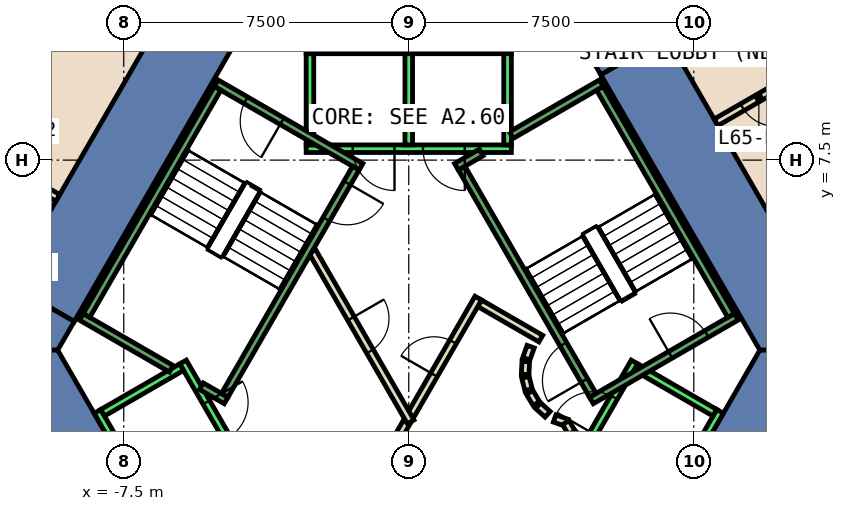
"""IFC4 building model, lengths in metres.
Left out: names, types, materials, properties, quantities, classifications, styles, units other than length and angle.
Written with IfcOpenShell. Run it as: python <this file> out.ifc"""

import sys

from ifc_helpers import new_model, si_unit, direction, frame, frame_2d, origin, place, context, subcontext, project, spatial, polyline, rectangle, outline, extrude, element, fill, save


model = new_model("IFC4")
c1 = context("Model", 3, precision=1e-05, world=origin(), true_north=direction((0.0, 1.0)))
c2 = subcontext(c1, "Body", "Model", "MODEL_VIEW")
j1 = project(units=[si_unit("LENGTHUNIT", "METRE"), si_unit("PLANEANGLEUNIT", "RADIAN")], contexts=[c1])
p1 = place(None, origin())
s1 = spatial("IfcSite", under=j1, at=p1, CompositionType="ELEMENT")
p2 = place(p1, origin())
s2 = spatial("IfcBuilding", under=s1, at=p2, CompositionType="ELEMENT")
p3 = place(p2, frame((0.0, 0.0, 281.0)))
s3 = spatial("IfcBuildingStorey", under=s2, at=p3, CompositionType="ELEMENT", Elevation=281.0)
p4 = place(p3, frame((0.0, 0.0, -0.6)))
e1 = element("IfcWall", 1, at=p4, inside=s3, PredefinedType="SHEAR", context=c2, shape_type="SweptSolid", body=[
    extrude(outline(polyline([(6.786, 10.747), (5.054, 9.747), (9.238, 2.5), (11.547, 2.5), (6.786, 10.747)])), origin(), (0.0, 0.0, 1.0), 5.4),
])
p5 = place(p3, frame((0.0, 0.0, 3.6)))
e2 = element("IfcWall", 2, at=p5, inside=s3, PredefinedType="SHEAR", context=c2, shape_type="SweptSolid", body=[
    extrude(outline(polyline([(5.889, 12.301), (5.544, 12.102), (4.619, 10.5), (5.054, 9.747), (6.786, 10.747), (5.889, 12.301)])), origin(), (0.0, 0.0, 1.0), 1.2),
])
p6 = place(p3, frame((0.0, 0.0, -0.6)))
e3 = element("IfcWall", 3, at=p6, inside=s3, PredefinedType="SHEAR", context=c2, shape_type="SweptSolid", body=[
    extrude(outline(polyline([(-10.535, 4.253), (-8.803, 3.253), (-4.619, 10.5), (-5.774, 12.5), (-10.535, 4.253)])), origin(), (0.0, 0.0, 1.0), 5.4),
])
p7 = place(p3, frame((0.0, 0.0, 3.6)))
e4 = element("IfcWall", 4, at=p7, inside=s3, PredefinedType="SHEAR", context=c2, shape_type="SweptSolid", body=[
    extrude(outline(polyline([(-11.432, 2.699), (-11.088, 2.5), (-9.238, 2.5), (-8.803, 3.253), (-10.535, 4.253), (-11.432, 2.699)])), origin(), (0.0, 0.0, 1.0), 1.2),
])
p8 = place(p3, frame((0.0, 0.0, -0.6)))
e5 = element("IfcWall", 5, at=p8, inside=s3, PredefinedType="SHEAR", context=c2, shape_type="SweptSolid", body=[
    extrude(outline(polyline([(-11.547, 2.5), (-5.774, -7.5), (-4.619, -5.5), (-9.238, 2.5), (-11.547, 2.5)])), origin(), (0.0, 0.0, 1.0), 5.4),
])
p9 = place(p3, frame((0.0, 0.0, -0.6)))
e6 = element("IfcWall", 6, at=p9, inside=s3, PredefinedType="SHEAR", context=c2, shape_type="SweptSolid", body=[
    extrude(outline(polyline([(5.774, -7.5), (11.547, 2.5), (9.238, 2.5), (4.619, -5.5), (5.774, -7.5)])), origin(), (0.0, 0.0, 1.0), 5.4),
])
p10 = place(p3, frame((-0.982, -1.0, 0.0), z_axis=(0.0, 0.0, 1.0), x_axis=(0.50024047865, 0.865886518847, 0.0)))
e7 = element("IfcWall", 7, at=p10, inside=s3, PredefinedType="PARTITIONING", context=c2, shape_type="SweptSolid", body=[
    extrude(rectangle(XDim=1.863, YDim=0.2, at=frame_2d((0.931, 0.0))), origin(), (0.0, 0.0, 1.0), 4.8),
])
p11 = place(p3, frame((1.866, 3.732, 0.0), z_axis=(0.0, 0.0, 1.0), x_axis=(0.866043361281, -0.499968895414, 0.0)))
e8 = element("IfcWall", 8, at=p11, inside=s3, PredefinedType="PARTITIONING", context=c2, shape_type="SweptSolid", body=[
    extrude(rectangle(XDim=1.858, YDim=0.2, at=frame_2d((0.929, 0.0))), origin(), (0.0, 0.0, 1.0), 4.8),
])
p12 = place(p3, frame((3.208, 2.592, 0.0), z_axis=(0.0, 0.0, 1.0), x_axis=(-0.337388820924, -0.941365382578, 0.0)))
e9 = element("IfcWall", 9, at=p12, inside=s3, PredefinedType="PARTITIONING", context=c2, shape_type="SweptSolid", body=[
    extrude(rectangle(XDim=0.338, YDim=0.2, at=frame_2d((0.169, 0.0))), origin(), (0.0, 0.0, 1.0), 4.8),
])
p13 = place(p3, frame((3.079, 2.199, 0.0), z_axis=(0.0, 0.0, 1.0), x_axis=(-0.047771483479, -0.998858290933, 0.0)))
e10 = element("IfcWall", 10, at=p13, inside=s3, PredefinedType="PARTITIONING", context=c2, shape_type="SweptSolid", body=[
    extrude(rectangle(XDim=0.337, YDim=0.2, at=frame_2d((0.169, 0.0))), origin(), (0.0, 0.0, 1.0), 4.8),
])
p14 = place(p3, frame((3.07, 1.786, 0.0), z_axis=(0.0, 0.0, 1.0), x_axis=(0.242705583207, -0.970099994784, 0.0)))
e11 = element("IfcWall", 11, at=p14, inside=s3, PredefinedType="PARTITIONING", context=c2, shape_type="SweptSolid", body=[
    extrude(rectangle(XDim=0.338, YDim=0.2, at=frame_2d((0.169, 0.0))), origin(), (0.0, 0.0, 1.0), 4.8),
])
for number, where, z_axis, x_axis in (
    (12, (3.182, 1.388, 0.0), (0.0, 0.0, 1.0), (0.512, -0.859, 0.0)),
    (13, (3.404, 1.039, 0.0), (0.0, 0.0, 1.0), (0.74, -0.672, 0.0)),
):
    element("IfcWall", number, at=place(p3, frame(where, z_axis=z_axis, x_axis=x_axis)), inside=s3, PredefinedType="PARTITIONING", context=c2, shape_type="SweptSolid", body=[
        extrude(rectangle(XDim=0.338, YDim=0.2, at=frame_2d((0.169, 0.0))), origin(), (0.0, 0.0, 1.0), 4.8),
    ])
p15 = place(p3, frame((3.838, 0.702, 0.0), z_axis=(0.0, 0.0, 1.0), x_axis=(0.941035081519, -0.338308993895, 0.0)))
e14 = element("IfcWall", 14, at=p15, inside=s3, PredefinedType="PARTITIONING", context=c2, shape_type="SweptSolid", body=[
    extrude(rectangle(XDim=0.337, YDim=0.2, at=frame_2d((0.168, 0.0))), origin(), (0.0, 0.0, 1.0), 4.8),
])
p16 = place(p3, frame((4.132, 0.593, 0.0), z_axis=(0.0, 0.0, 1.0), x_axis=(0.513561617048, -0.858052717201, 0.0)))
e15 = element("IfcWall", 15, at=p16, inside=s3, PredefinedType="PARTITIONING", context=c2, shape_type="SweptSolid", body=[
    extrude(rectangle(XDim=0.308, YDim=0.2, at=frame_2d((0.154, 0.0))), origin(), (0.0, 0.0, 1.0), 4.8),
])
p17 = place(p3, frame((4.301, 0.315, 0.0), z_axis=(0.0, 0.0, 1.0), x_axis=(0.741798017506, -0.670623367639, 0.0)))
e16 = element("IfcWall", 16, at=p17, inside=s3, PredefinedType="PARTITIONING", context=c2, shape_type="SweptSolid", body=[
    extrude(rectangle(XDim=0.309, YDim=0.2, at=frame_2d((0.154, 0.0))), origin(), (0.0, 0.0, 1.0), 4.8),
])
p18 = place(p3, frame((0.05, 0.787, 0.0), z_axis=(0.0, 0.0, 1.0), x_axis=(0.499954076797, 0.866051915934, 0.0)))
e17 = element("IfcWall", 17, at=p18, inside=s3, PredefinedType="PARTITIONING", context=c2, shape_type="SweptSolid", body=[
    extrude(rectangle(XDim=3.558, YDim=0.2, at=frame_2d((1.779, 0.0))), origin(), (0.0, 0.0, 1.0), 4.8),
])
p19 = place(p18, frame((1.229, 0.0, 0.0)))
e18 = element("IfcOpeningElement", 18, at=p19, cuts=e17, PredefinedType="OPENING", context=c2, shape_type="SweptSolid", body=[
    extrude(rectangle(XDim=1.0, YDim=2.1, at=frame_2d((0.5, 1.05))), frame((0.0, 0.11, 0.0), z_axis=(0.0, -1.0, 0.0), x_axis=(1.0, 0.0, 0.0)), (0.0, 0.0, 1.0), 0.22),
])
p20 = place(p3, frame((-2.54, 5.1, 0.0), z_axis=(0.0, 0.0, 1.0), x_axis=(0.499925051871, -0.866068670783, 0.0)))
e19 = element("IfcWall", 19, at=p20, inside=s3, PredefinedType="PARTITIONING", context=c2, shape_type="SweptSolid", body=[
    extrude(rectangle(XDim=5.181, YDim=0.2, at=frame_2d((2.59, 0.0))), origin(), (0.0, 0.0, 1.0), 4.8),
])
p21 = place(p20, frame((2.04, 0.0, 0.0)))
e20 = element("IfcOpeningElement", 20, at=p21, cuts=e19, PredefinedType="OPENING", context=c2, shape_type="SweptSolid", body=[
    extrude(rectangle(XDim=1.0, YDim=2.1, at=frame_2d((0.5, 1.05))), frame((0.0, 0.11, 0.0), z_axis=(0.0, -1.0, 0.0), x_axis=(1.0, 0.0, 0.0)), (0.0, 0.0, 1.0), 0.22),
])
p22 = place(p3, frame((10.165, 9.693, 0.0), z_axis=(0.0, 0.0, 1.0), x_axis=(-0.865955154139, -0.50012165622, 0.0)))
e21 = element("IfcWall", 21, at=p22, inside=s3, PredefinedType="PARTITIONING", context=c2, shape_type="SweptSolid", body=[
    extrude(rectangle(XDim=2.4, YDim=0.2, at=frame_2d((1.2, 0.0))), origin(), (0.0, 0.0, 1.0), 2.4),
])
p23 = place(p22, frame((0.6, 0.0, 0.0)))
e22 = element("IfcOpeningElement", 22, at=p23, cuts=e21, PredefinedType="OPENING", context=c2, shape_type="SweptSolid", body=[
    extrude(rectangle(XDim=1.0, YDim=2.1, at=frame_2d((0.5, 1.05))), frame((0.0, 0.11, 0.0), z_axis=(0.0, -1.0, 0.0), x_axis=(1.0, 0.0, 0.0)), (0.0, 0.0, 1.0), 0.22),
])
p24 = place(p3, frame((-11.312, 7.707, 0.0), z_axis=(0.0, 0.0, 1.0), x_axis=(0.865999212041, -0.500045362686, 0.0)))
e23 = element("IfcWall", 23, at=p24, inside=s3, PredefinedType="PARTITIONING", context=c2, shape_type="SweptSolid", body=[
    extrude(rectangle(XDim=2.4, YDim=0.2, at=frame_2d((1.2, 0.0))), origin(), (0.0, 0.0, 1.0), 4.8),
])
p25 = place(p24, frame((0.6, 0.0, 0.0)))
e24 = element("IfcOpeningElement", 24, at=p25, cuts=e23, PredefinedType="OPENING", context=c2, shape_type="SweptSolid", body=[
    extrude(rectangle(XDim=1.0, YDim=2.1, at=frame_2d((0.5, 1.05))), frame((0.0, 0.11, 0.0), z_axis=(0.0, -1.0, 0.0), x_axis=(1.0, 0.0, 0.0)), (0.0, 0.0, 1.0), 0.22),
])
p26 = place(p3, frame((2.7, 7.8, 0.0), z_axis=(0.0, 0.0, 1.0), x_axis=(-1.0, 0.0, 0.0)))
e25 = element("IfcWall", 25, at=p26, inside=s3, PredefinedType="STANDARD", context=c2, shape_type="SweptSolid", body=[
    extrude(rectangle(XDim=5.4, YDim=0.2, at=frame_2d((2.7, 0.0))), origin(), (0.0, 0.0, 1.0), 4.8),
])
p27 = place(p26, frame((1.225, 0.0, 0.0)))
e26 = element("IfcOpeningElement", 26, at=p27, cuts=e25, PredefinedType="OPENING", context=c2, shape_type="SweptSolid", body=[
    extrude(rectangle(XDim=1.1, YDim=2.1, at=frame_2d((0.55, 1.05))), frame((0.0, 0.11, 0.0), z_axis=(0.0, -1.0, 0.0), x_axis=(1.0, 0.0, 0.0)), (0.0, 0.0, 1.0), 0.22),
])
p28 = place(p26, frame((3.075, 0.0, 0.0)))
e27 = element("IfcOpeningElement", 27, at=p28, cuts=e25, PredefinedType="OPENING", context=c2, shape_type="SweptSolid", body=[
    extrude(rectangle(XDim=1.1, YDim=2.1, at=frame_2d((0.55, 1.05))), frame((0.0, 0.11, 0.0), z_axis=(0.0, -1.0, 0.0), x_axis=(1.0, 0.0, 0.0)), (0.0, 0.0, 1.0), 0.22),
])
p29 = place(p3, frame((2.7, 10.4, 0.0), z_axis=(0.0, 0.0, 1.0), x_axis=(-1.0, 0.0, 0.0)))
e28 = element("IfcWall", 28, at=p29, inside=s3, PredefinedType="STANDARD", context=c2, shape_type="SweptSolid", body=[
    extrude(rectangle(XDim=5.4, YDim=0.2, at=frame_2d((2.7, 0.0))), origin(), (0.0, 0.0, 1.0), 4.8),
])
for number, where, z_axis, x_axis in (
    (29, (2.6, 7.9, 0.0), (0.0, 0.0, 1.0), (0.0, 1.0, 0.0)),
    (30, (0.0, 7.9, 0.0), (0.0, 0.0, 1.0), (0.0, 1.0, 0.0)),
    (31, (-2.6, 7.9, 0.0), (0.0, 0.0, 1.0), (0.0, 1.0, 0.0)),
):
    element("IfcWall", number, at=place(p3, frame(where, z_axis=z_axis, x_axis=x_axis)), inside=s3, PredefinedType="STANDARD", context=c2, shape_type="SweptSolid", body=[
        extrude(rectangle(XDim=2.4, YDim=0.2, at=frame_2d((1.2, 0.0))), origin(), (0.0, 0.0, 1.0), 4.8),
    ])
p30 = place(p3, frame((-5.94, 2.188, 0.0), z_axis=(0.0, 0.0, 1.0), x_axis=(0.500034260056, -0.866005622828, 0.0)))
e32 = element("IfcWall", 32, at=p30, inside=s3, PredefinedType="STANDARD", context=c2, shape_type="SweptSolid", body=[
    extrude(rectangle(XDim=5.399, YDim=0.2, at=frame_2d((2.7, 0.0))), origin(), (0.0, 0.0, 1.0), 4.8),
])
p31 = place(p30, frame((3.075, 0.0, 0.0)))
e33 = element("IfcOpeningElement", 33, at=p31, cuts=e32, PredefinedType="OPENING", context=c2, shape_type="SweptSolid", body=[
    extrude(rectangle(XDim=1.1, YDim=2.1, at=frame_2d((0.55, 1.05))), frame((0.0, 0.11, 0.0), z_axis=(0.0, -1.0, 0.0), x_axis=(1.0, 0.0, 0.0)), (0.0, 0.0, 1.0), 0.22),
])
p32 = place(p30, frame((1.225, 0.0, 0.0)))
e34 = element("IfcOpeningElement", 34, at=p32, cuts=e32, PredefinedType="OPENING", context=c2, shape_type="SweptSolid", body=[
    extrude(rectangle(XDim=1.1, YDim=2.1, at=frame_2d((0.55, 1.05))), frame((0.0, 0.11, 0.0), z_axis=(0.0, -1.0, 0.0), x_axis=(1.0, 0.0, 0.0)), (0.0, 0.0, 1.0), 0.22),
])
p33 = place(p3, frame((-8.192, 0.888, 0.0), z_axis=(0.0, 0.0, 1.0), x_axis=(0.500034260056, -0.866005622828, 0.0)))
e35 = element("IfcWall", 35, at=p33, inside=s3, PredefinedType="STANDARD", context=c2, shape_type="SweptSolid", body=[
    extrude(rectangle(XDim=5.399, YDim=0.2, at=frame_2d((2.7, 0.0))), origin(), (0.0, 0.0, 1.0), 4.8),
])
p34 = place(p3, frame((-5.977, 2.052, 0.0), z_axis=(0.0, 0.0, 1.0), x_axis=(-0.865973769406, -0.500089422704, 0.0)))
e36 = element("IfcWall", 36, at=p34, inside=s3, PredefinedType="STANDARD", context=c2, shape_type="SweptSolid", body=[
    extrude(rectangle(XDim=2.399, YDim=0.2, at=frame_2d((1.2, 0.0))), origin(), (0.0, 0.0, 1.0), 4.8),
])
p35 = place(p3, frame((3.24, -2.488, 0.0), z_axis=(0.0, 0.0, 1.0), x_axis=(0.500034260056, 0.866005622828, 0.0)))
e37 = element("IfcWall", 37, at=p35, inside=s3, PredefinedType="STANDARD", context=c2, shape_type="SweptSolid", body=[
    extrude(rectangle(XDim=5.399, YDim=0.2, at=frame_2d((2.7, 0.0))), origin(), (0.0, 0.0, 1.0), 4.8),
])
p36 = place(p35, frame((3.225, 0.0, 0.0)))
e38 = element("IfcOpeningElement", 38, at=p36, cuts=e37, PredefinedType="OPENING", context=c2, shape_type="SweptSolid", body=[
    extrude(rectangle(XDim=1.1, YDim=2.1, at=frame_2d((0.55, 1.05))), frame((0.0, 0.11, 0.0), z_axis=(0.0, -1.0, 0.0), x_axis=(1.0, 0.0, 0.0)), (0.0, 0.0, 1.0), 0.22),
])
p37 = place(p35, frame((1.225, 0.0, 0.0)))
e39 = element("IfcOpeningElement", 39, at=p37, cuts=e37, PredefinedType="OPENING", context=c2, shape_type="SweptSolid", body=[
    extrude(rectangle(XDim=1.1, YDim=2.1, at=frame_2d((0.55, 1.05))), frame((0.0, 0.11, 0.0), z_axis=(0.0, -1.0, 0.0), x_axis=(1.0, 0.0, 0.0)), (0.0, 0.0, 1.0), 0.22),
])
p38 = place(p3, frame((5.492, -3.788, 0.0), z_axis=(0.0, 0.0, 1.0), x_axis=(0.500034260056, 0.866005622828, 0.0)))
e40 = element("IfcWall", 40, at=p38, inside=s3, PredefinedType="STANDARD", context=c2, shape_type="SweptSolid", body=[
    extrude(rectangle(XDim=5.399, YDim=0.2, at=frame_2d((2.7, 0.0))), origin(), (0.0, 0.0, 1.0), 4.8),
])
p39 = place(p3, frame((5.977, 2.052, 0.0), z_axis=(0.0, 0.0, 1.0), x_axis=(0.865973769406, -0.500089422704, 0.0)))
e41 = element("IfcWall", 41, at=p39, inside=s3, PredefinedType="STANDARD", context=c2, shape_type="SweptSolid", body=[
    extrude(rectangle(XDim=2.399, YDim=0.2, at=frame_2d((1.2, 0.0))), origin(), (0.0, 0.0, 1.0), 4.8),
])
p40 = place(p3, frame((4.806, 1.176, 0.0), z_axis=(0.0, 0.0, 1.0), x_axis=(0.866059941101, 0.499940174841, 0.0)))
e42 = element("IfcWall", 42, at=p40, inside=s3, PredefinedType="STANDARD", context=c2, shape_type="SweptSolid", body=[
    extrude(rectangle(XDim=4.4, YDim=0.2, at=frame_2d((2.2, 0.0))), origin(), (0.0, 0.0, 1.0), 4.8),
])
p41 = place(p40, frame((2.4, 0.0, 0.0)))
e43 = element("IfcOpeningElement", 43, at=p41, cuts=e42, PredefinedType="OPENING", context=c2, shape_type="SweptSolid", body=[
    extrude(rectangle(XDim=1.1, YDim=2.2, at=frame_2d((0.55, 1.1))), frame((0.0, 0.11, 0.0), z_axis=(0.0, -1.0, 0.0), x_axis=(1.0, 0.0, 0.0)), (0.0, 0.0, 1.0), 0.22),
])
p42 = place(p3, frame((2.7, 8.158, 0.0), z_axis=(0.0, 0.0, 1.0), x_axis=(0.86611865017, 0.499838457731, 0.0)))
e44 = element("IfcWall", 44, at=p42, inside=s3, PredefinedType="STANDARD", context=c2, shape_type="SweptSolid", body=[
    extrude(rectangle(XDim=2.733, YDim=0.2, at=frame_2d((1.366, 0.0))), origin(), (0.0, 0.0, 1.0), 4.8),
])
p43 = place(p3, frame((1.256, 7.324, 0.0), z_axis=(0.0, 0.0, 1.0), x_axis=(0.865915093549, 0.500191014278, 0.0)))
e45 = element("IfcWall", 45, at=p43, inside=s3, PredefinedType="STANDARD", context=c2, shape_type="SweptSolid", body=[
    extrude(rectangle(XDim=0.752, YDim=0.2, at=frame_2d((0.376, 0.0))), origin(), (0.0, 0.0, 1.0), 4.8),
])
p44 = place(p3, frame((4.843, 1.312, 0.0), z_axis=(0.0, 0.0, 1.0), x_axis=(-0.499963383562, 0.866046543262, 0.0)))
e46 = element("IfcWall", 46, at=p44, inside=s3, PredefinedType="STANDARD", context=c2, shape_type="SweptSolid", body=[
    extrude(rectangle(XDim=6.9, YDim=0.2, at=frame_2d((3.45, 0.0))), origin(), (0.0, 0.0, 1.0), 4.8),
])
p45 = place(p44, frame((0.45, 0.0, 0.0)))
e47 = element("IfcOpeningElement", 47, at=p45, cuts=e46, PredefinedType="OPENING", context=c2, shape_type="SweptSolid", body=[
    extrude(rectangle(XDim=1.1, YDim=2.2, at=frame_2d((0.55, 1.1))), frame((0.0, 0.11, 0.0), z_axis=(0.0, -1.0, 0.0), x_axis=(1.0, 0.0, 0.0)), (0.0, 0.0, 1.0), 0.22),
])
p46 = place(p3, frame((8.48, 3.412, 0.0), z_axis=(0.0, 0.0, 1.0), x_axis=(-0.499978703459, 0.866037698999, 0.0)))
e48 = element("IfcWall", 48, at=p46, inside=s3, PredefinedType="STANDARD", context=c2, shape_type="SweptSolid", body=[
    extrude(rectangle(XDim=6.9, YDim=0.2, at=frame_2d((3.45, 0.0))), origin(), (0.0, 0.0, 1.0), 4.8),
])
p47 = place(p3, frame((-1.256, 7.324, 0.0), z_axis=(0.0, 0.0, 1.0), x_axis=(-0.866046073146, 0.499964197906, 0.0)))
e49 = element("IfcWall", 49, at=p47, inside=s3, PredefinedType="STANDARD", context=c2, shape_type="SweptSolid", body=[
    extrude(rectangle(XDim=4.4, YDim=0.2, at=frame_2d((2.2, 0.0))), origin(), (0.0, 0.0, 1.0), 4.8),
])
p48 = place(p47, frame((2.4, 0.0, 0.0)))
e50 = element("IfcOpeningElement", 50, at=p48, cuts=e49, PredefinedType="OPENING", context=c2, shape_type="SweptSolid", body=[
    extrude(rectangle(XDim=1.1, YDim=2.2, at=frame_2d((0.55, 1.1))), frame((0.0, 0.11, 0.0), z_axis=(0.0, -1.0, 0.0), x_axis=(1.0, 0.0, 0.0)), (0.0, 0.0, 1.0), 0.22),
])
p49 = place(p3, frame((-6.25, 2.01, 0.0), z_axis=(0.0, 0.0, 1.0), x_axis=(-0.86611865017, 0.499838457731, 0.0)))
e51 = element("IfcWall", 51, at=p49, inside=s3, PredefinedType="STANDARD", context=c2, shape_type="SweptSolid", body=[
    extrude(rectangle(XDim=2.733, YDim=0.2, at=frame_2d((1.366, 0.0))), origin(), (0.0, 0.0, 1.0), 4.8),
])
p50 = place(p3, frame((-4.806, 1.176, 0.0), z_axis=(0.0, 0.0, 1.0), x_axis=(-0.866558586415, 0.499075361355, 0.0)))
e52 = element("IfcWall", 52, at=p50, inside=s3, PredefinedType="STANDARD", context=c2, shape_type="SweptSolid", body=[
    extrude(rectangle(XDim=0.751, YDim=0.2, at=frame_2d((0.376, 0.0))), origin(), (0.0, 0.0, 1.0), 4.8),
])
p51 = place(p3, frame((-1.393, 7.288, 0.0), z_axis=(0.0, 0.0, 1.0), x_axis=(-0.499963383562, -0.866046543262, 0.0)))
e53 = element("IfcWall", 53, at=p51, inside=s3, PredefinedType="STANDARD", context=c2, shape_type="SweptSolid", body=[
    extrude(rectangle(XDim=6.9, YDim=0.2, at=frame_2d((3.45, 0.0))), origin(), (0.0, 0.0, 1.0), 4.8),
])
p52 = place(p51, frame((0.45, 0.0, 0.0)))
e54 = element("IfcOpeningElement", 54, at=p52, cuts=e53, PredefinedType="OPENING", context=c2, shape_type="SweptSolid", body=[
    extrude(rectangle(XDim=1.1, YDim=2.2, at=frame_2d((0.55, 1.1))), frame((0.0, 0.11, 0.0), z_axis=(0.0, -1.0, 0.0), x_axis=(1.0, 0.0, 0.0)), (0.0, 0.0, 1.0), 0.22),
])
p53 = place(p3, frame((-5.03, 9.388, 0.0), z_axis=(0.0, 0.0, 1.0), x_axis=(-0.499978703459, -0.866037698999, 0.0)))
e55 = element("IfcWall", 55, at=p53, inside=s3, PredefinedType="STANDARD", context=c2, shape_type="SweptSolid", body=[
    extrude(rectangle(XDim=6.9, YDim=0.2, at=frame_2d((3.45, 0.0))), origin(), (0.0, 0.0, 1.0), 4.8),
])
p54 = place(p23, origin())
e56 = element("IfcDoor", 56, at=p54, inside=s3, OperationType="SINGLE_SWING_LEFT", PredefinedType="DOOR", context=c2, shape_type="SweptSolid", body=[
    extrude(rectangle(XDim=1.0, YDim=2.1, at=frame_2d((0.5, 1.05))), frame((0.0, 0.025, 0.0), z_axis=(0.0, -1.0, 0.0), x_axis=(1.0, 0.0, 0.0)), (0.0, 0.0, 1.0), 0.05),
])
fill(e22, e56)
p55 = place(p19, origin())
e57 = element("IfcDoor", 57, at=p55, inside=s3, OperationType="SINGLE_SWING_RIGHT", PredefinedType="DOOR", context=c2, shape_type="SweptSolid", body=[
    extrude(rectangle(XDim=1.0, YDim=2.1, at=frame_2d((0.5, 1.05))), frame((0.0, 0.025, 0.0), z_axis=(0.0, -1.0, 0.0), x_axis=(1.0, 0.0, 0.0)), (0.0, 0.0, 1.0), 0.05),
])
fill(e18, e57)
p56 = place(p21, origin())
e58 = element("IfcDoor", 58, at=p56, inside=s3, OperationType="SINGLE_SWING_RIGHT", PredefinedType="DOOR", context=c2, shape_type="SweptSolid", body=[
    extrude(rectangle(XDim=1.0, YDim=2.1, at=frame_2d((0.5, 1.05))), frame((0.0, 0.025, 0.0), z_axis=(0.0, -1.0, 0.0), x_axis=(1.0, 0.0, 0.0)), (0.0, 0.0, 1.0), 0.05),
])
fill(e20, e58)
p57 = place(p27, origin())
e59 = element("IfcDoor", 59, at=p57, inside=s3, OperationType="SLIDING_TO_LEFT", PredefinedType="DOOR", context=c2, shape_type="SweptSolid", body=[
    extrude(rectangle(XDim=1.1, YDim=2.1, at=frame_2d((0.55, 1.05))), frame((0.0, 0.025, 0.0), z_axis=(0.0, -1.0, 0.0), x_axis=(1.0, 0.0, 0.0)), (0.0, 0.0, 1.0), 0.05),
])
fill(e26, e59)
p58 = place(p28, origin())
e60 = element("IfcDoor", 60, at=p58, inside=s3, OperationType="SLIDING_TO_LEFT", PredefinedType="DOOR", context=c2, shape_type="SweptSolid", body=[
    extrude(rectangle(XDim=1.1, YDim=2.1, at=frame_2d((0.55, 1.05))), frame((0.0, 0.025, 0.0), z_axis=(0.0, -1.0, 0.0), x_axis=(1.0, 0.0, 0.0)), (0.0, 0.0, 1.0), 0.05),
])
fill(e27, e60)
p59 = place(p36, origin())
e61 = element("IfcDoor", 61, at=p59, inside=s3, OperationType="SLIDING_TO_LEFT", PredefinedType="DOOR", context=c2, shape_type="SweptSolid", body=[
    extrude(rectangle(XDim=1.1, YDim=2.1, at=frame_2d((0.55, 1.05))), frame((0.0, 0.025, 0.0), z_axis=(0.0, -1.0, 0.0), x_axis=(1.0, 0.0, 0.0)), (0.0, 0.0, 1.0), 0.05),
])
fill(e38, e61)
p60 = place(p32, origin())
e62 = element("IfcDoor", 62, at=p60, inside=s3, OperationType="SLIDING_TO_LEFT", PredefinedType="DOOR", context=c2, shape_type="SweptSolid", body=[
    extrude(rectangle(XDim=1.1, YDim=2.1, at=frame_2d((0.55, 1.05))), frame((0.0, 0.025, 0.0), z_axis=(0.0, -1.0, 0.0), x_axis=(1.0, 0.0, 0.0)), (0.0, 0.0, 1.0), 0.05),
])
fill(e34, e62)
p61 = place(p45, origin())
e63 = element("IfcDoor", 63, at=p61, inside=s3, OperationType="SINGLE_SWING_LEFT", PredefinedType="DOOR", context=c2, shape_type="SweptSolid", body=[
    extrude(rectangle(XDim=1.1, YDim=2.2, at=frame_2d((0.55, 1.1))), frame((0.0, 0.025, 0.0), z_axis=(0.0, -1.0, 0.0), x_axis=(1.0, 0.0, 0.0)), (0.0, 0.0, 1.0), 0.05),
])
fill(e47, e63)
p62 = place(p41, origin())
e64 = element("IfcDoor", 64, at=p62, inside=s3, OperationType="SINGLE_SWING_LEFT", PredefinedType="DOOR", context=c2, shape_type="SweptSolid", body=[
    extrude(rectangle(XDim=1.1, YDim=2.2, at=frame_2d((0.55, 1.1))), frame((0.0, 0.025, 0.0), z_axis=(0.0, -1.0, 0.0), x_axis=(1.0, 0.0, 0.0)), (0.0, 0.0, 1.0), 0.05),
])
fill(e43, e64)
p63 = place(p52, origin())
e65 = element("IfcDoor", 65, at=p63, inside=s3, OperationType="SINGLE_SWING_LEFT", PredefinedType="DOOR", context=c2, shape_type="SweptSolid", body=[
    extrude(rectangle(XDim=1.1, YDim=2.2, at=frame_2d((0.55, 1.1))), frame((0.0, 0.025, 0.0), z_axis=(0.0, -1.0, 0.0), x_axis=(1.0, 0.0, 0.0)), (0.0, 0.0, 1.0), 0.05),
])
fill(e54, e65)
p64 = place(p48, origin())
e66 = element("IfcDoor", 66, at=p64, inside=s3, OperationType="SINGLE_SWING_LEFT", PredefinedType="DOOR", context=c2, shape_type="SweptSolid", body=[
    extrude(rectangle(XDim=1.1, YDim=2.2, at=frame_2d((0.55, 1.1))), frame((0.0, 0.025, 0.0), z_axis=(0.0, -1.0, 0.0), x_axis=(1.0, 0.0, 0.0)), (0.0, 0.0, 1.0), 0.05),
])
fill(e50, e66)
save(model, sys.argv[1])
